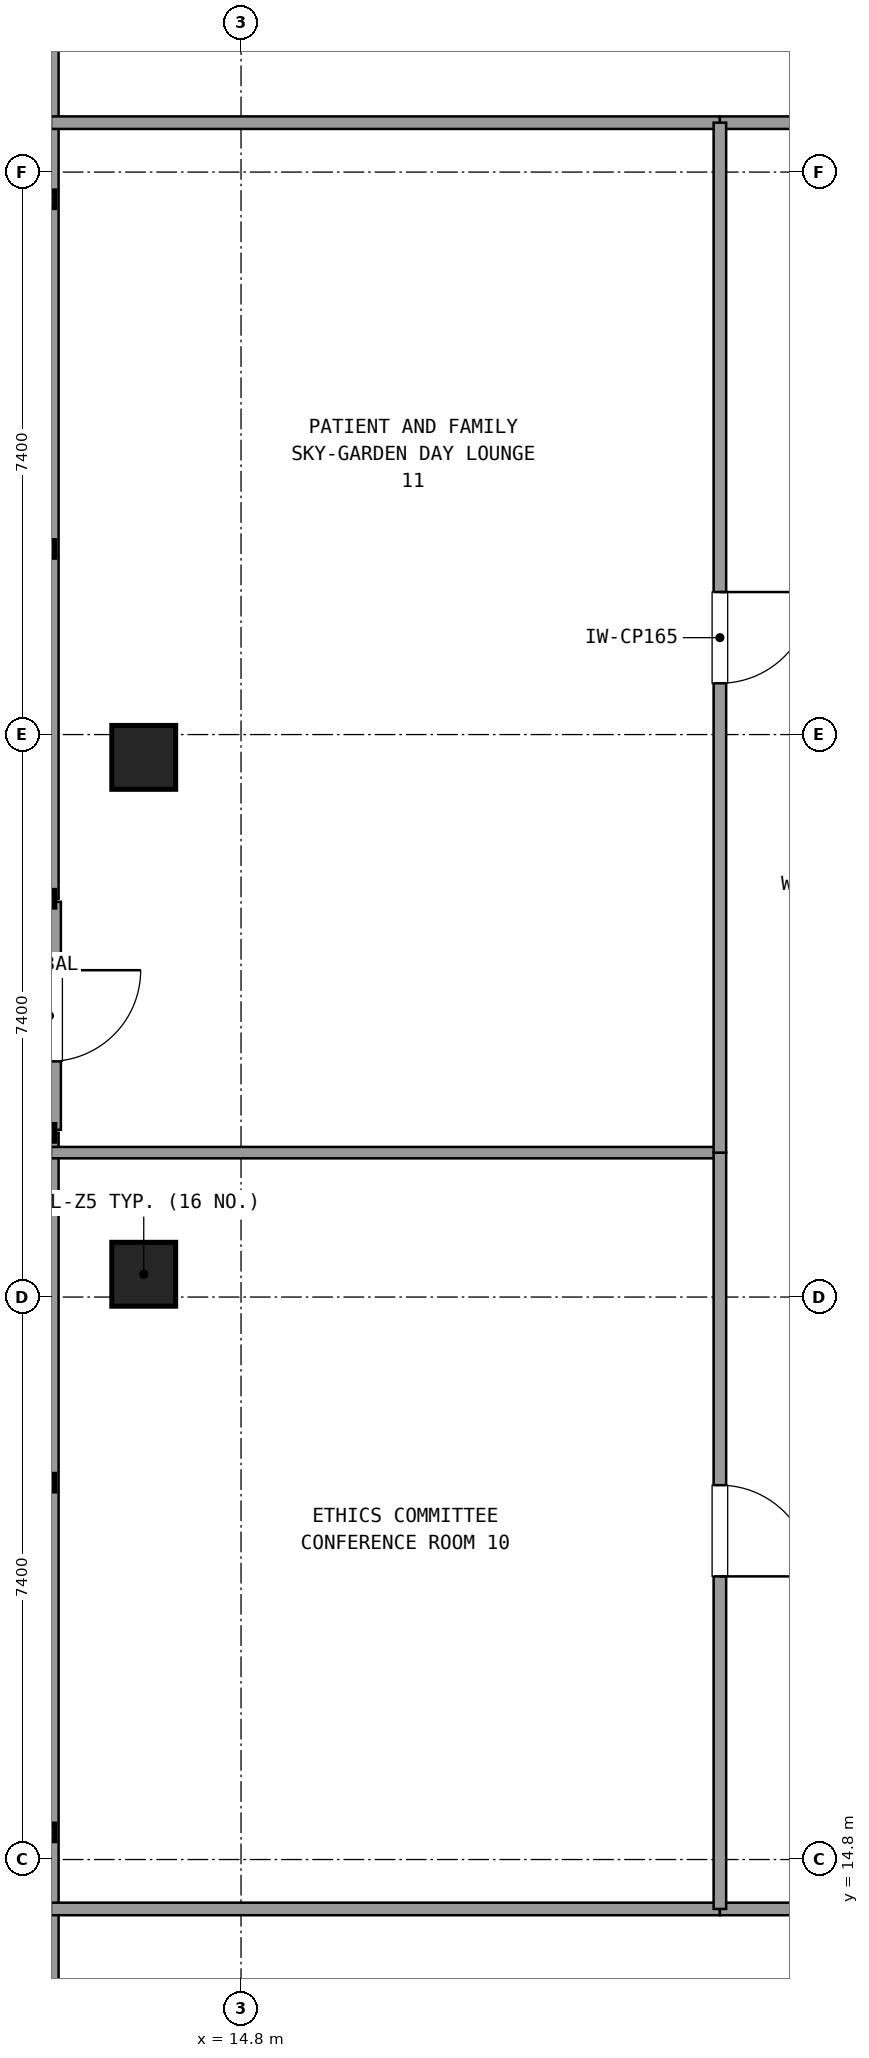
"""IFC4 building model, lengths in metres.
Left out: names, types, materials, properties, quantities, classifications, styles, units other than length and angle.
Written with IfcOpenShell. Run it as: python <this file> out.ifc"""

import sys

from ifc_helpers import new_model, si_unit, direction, frame, frame_2d, origin, origin_2d, place, context, subcontext, project, spatial, rectangle, extrude, element, fill, save


model = new_model("IFC4")
c1 = context("Model", 3, precision=1e-05, world=origin(), true_north=direction((0.0, 1.0)))
c2 = subcontext(c1, "Body", "Model", "MODEL_VIEW")
j1 = project(units=[si_unit("LENGTHUNIT", "METRE"), si_unit("PLANEANGLEUNIT", "RADIAN")], contexts=[c1])
p1 = place(None, origin())
s1 = spatial("IfcSite", under=j1, at=p1, CompositionType="ELEMENT")
p2 = place(p1, origin())
s2 = spatial("IfcBuilding", under=s1, at=p2, CompositionType="ELEMENT")
p3 = place(p2, frame((0.0, 0.0, 278.82)))
s3 = spatial("IfcBuildingStorey", under=s2, at=p3, CompositionType="ELEMENT", Elevation=278.82)
for number, where, z_axis, x_axis in (
    (1, (13.52, 22.5, 0.0), (0.0, 0.0, 1.0), (1.0, 0.0, 0.0)),
    (2, (13.52, 29.3, 0.0), (0.0, 0.0, 1.0), (1.0, 0.0, 0.0)),
):
    element("IfcColumn", number, at=place(p3, frame(where, z_axis=z_axis, x_axis=x_axis)), inside=s3, PredefinedType="COLUMN", context=c2, shape_type="SweptSolid", body=[
        extrude(rectangle(XDim=0.84, YDim=0.84, at=origin_2d()), origin(), (0.0, 0.0, 1.0), 3.6),
    ])
p4 = place(p3, frame((12.28, 27.4, 0.0), z_axis=(0.0, 0.0, 1.0), x_axis=(0.0, -1.0, 0.0)))
e3 = element("IfcWall", 3, at=p4, inside=s3, PredefinedType="SOLIDWALL", context=c2, shape_type="SweptSolid", body=[
    extrude(rectangle(XDim=3.0, YDim=0.3, at=frame_2d((1.5, 0.0))), origin(), (0.0, 0.0, 1.0), 2.69),
])
p5 = place(p4, frame((0.9, 0.0, 0.0)))
e4 = element("IfcOpeningElement", 4, at=p5, cuts=e3, PredefinedType="OPENING", context=c2, shape_type="SweptSolid", body=[
    extrude(rectangle(XDim=1.2, YDim=2.2, at=frame_2d((0.6, 1.1))), frame((0.0, 0.16, 0.0), z_axis=(0.0, -1.0, 0.0), x_axis=(1.0, 0.0, 0.0)), (0.0, 0.0, 1.0), 0.32),
])
for number, where, z_axis, x_axis in (
    (5, (12.28, 41.245, 0.0), (0.0, 0.0, 1.0), (0.0, -1.0, 0.0)),
    (6, (12.28, 24.36, 0.0), (0.0, 0.0, 1.0), (0.0, -1.0, 0.0)),
):
    element("IfcWall", number, at=place(p3, frame(where, z_axis=z_axis, x_axis=x_axis)), inside=s3, PredefinedType="SOLIDWALL", context=c2, shape_type="SweptSolid", body=[
        extrude(rectangle(XDim=13.805, YDim=0.24, at=frame_2d((6.903, 0.0))), origin(), (0.0, 0.0, 1.0), 0.85),
    ])
for number, where, z_axis, x_axis in (
    (7, (12.3, 37.65, 0.0), (0.0, 0.0, 1.0), (1.0, 0.0, 0.0)),
    (8, (12.3, 14.15, 0.0), (0.0, 0.0, 1.0), (1.0, 0.0, 0.0)),
):
    element("IfcWall", number, at=place(p3, frame(where, z_axis=z_axis, x_axis=x_axis)), inside=s3, PredefinedType="PARTITIONING", context=c2, shape_type="SweptSolid", body=[
        extrude(rectangle(XDim=8.8, YDim=0.165, at=frame_2d((4.4, 0.0))), origin(), (0.0, 0.0, 1.0), 2.61),
    ])
p6 = place(p3, frame((21.1, 37.65, 0.0), z_axis=(0.0, 0.0, 1.0), x_axis=(1.0, 0.0, 0.0)))
e9 = element("IfcWall", 9, at=p6, inside=s3, PredefinedType="PARTITIONING", context=c2, shape_type="SweptSolid", body=[
    extrude(rectangle(XDim=6.428, YDim=0.165, at=frame_2d((3.214, 0.0))), origin(), (0.0, 0.0, 1.0), 2.61),
])
p7 = place(p6, frame((2.614, 0.0, 0.0)))
e10 = element("IfcOpeningElement", 10, at=p7, cuts=e9, PredefinedType="OPENING", context=c2, shape_type="SweptSolid", body=[
    extrude(rectangle(XDim=1.2, YDim=2.15, at=frame_2d((0.6, 1.075))), frame((0.0, 0.093, 0.0), z_axis=(0.0, -1.0, 0.0), x_axis=(1.0, 0.0, 0.0)), (0.0, 0.0, 1.0), 0.185),
])
p8 = place(p3, frame((21.1, 14.15, 0.0), z_axis=(0.0, 0.0, 1.0), x_axis=(1.0, 0.0, 0.0)))
e11 = element("IfcWall", 11, at=p8, inside=s3, PredefinedType="PARTITIONING", context=c2, shape_type="SweptSolid", body=[
    extrude(rectangle(XDim=3.482, YDim=0.165, at=frame_2d((1.741, 0.0))), origin(), (0.0, 0.0, 1.0), 2.61),
])
p9 = place(p8, frame((1.141, 0.0, 0.0)))
e12 = element("IfcOpeningElement", 12, at=p9, cuts=e11, PredefinedType="OPENING", context=c2, shape_type="SweptSolid", body=[
    extrude(rectangle(XDim=1.2, YDim=2.15, at=frame_2d((0.6, 1.075))), frame((0.0, 0.093, 0.0), z_axis=(0.0, -1.0, 0.0), x_axis=(1.0, 0.0, 0.0)), (0.0, 0.0, 1.0), 0.185),
])
p10 = place(p3, frame((21.1, 24.1, 0.0), z_axis=(0.0, 0.0, 1.0), x_axis=(-1.0, 0.0, 0.0)))
e13 = element("IfcWall", 13, at=p10, inside=s3, PredefinedType="PARTITIONING", context=c2, shape_type="SweptSolid", body=[
    extrude(rectangle(XDim=8.8, YDim=0.15, at=frame_2d((4.4, 0.0))), origin(), (0.0, 0.0, 1.0), 2.61),
])
p11 = place(p3, frame((21.1, 14.15, 0.0), z_axis=(0.0, 0.0, 1.0), x_axis=(0.0, 1.0, 0.0)))
e14 = element("IfcWall", 14, at=p11, inside=s3, PredefinedType="PARTITIONING", context=c2, shape_type="SweptSolid", body=[
    extrude(rectangle(XDim=9.95, YDim=0.165, at=frame_2d((4.975, 0.0))), origin(), (0.0, 0.0, 1.0), 2.61),
])
p12 = place(p11, frame((4.375, 0.0, 0.0)))
e15 = element("IfcOpeningElement", 15, at=p12, cuts=e14, PredefinedType="OPENING", context=c2, shape_type="SweptSolid", body=[
    extrude(rectangle(XDim=1.2, YDim=2.15, at=frame_2d((0.6, 1.075))), frame((0.0, 0.093, 0.0), z_axis=(0.0, -1.0, 0.0), x_axis=(1.0, 0.0, 0.0)), (0.0, 0.0, 1.0), 0.185),
])
p13 = place(p3, frame((21.1, 24.1, 0.0), z_axis=(0.0, 0.0, 1.0), x_axis=(0.0, 1.0, 0.0)))
e16 = element("IfcWall", 16, at=p13, inside=s3, PredefinedType="PARTITIONING", context=c2, shape_type="SweptSolid", body=[
    extrude(rectangle(XDim=13.55, YDim=0.165, at=frame_2d((6.775, 0.0))), origin(), (0.0, 0.0, 1.0), 2.61),
])
p14 = place(p13, frame((6.175, 0.0, 0.0)))
e17 = element("IfcOpeningElement", 17, at=p14, cuts=e16, PredefinedType="OPENING", context=c2, shape_type="SweptSolid", body=[
    extrude(rectangle(XDim=1.2, YDim=2.15, at=frame_2d((0.6, 1.075))), frame((0.0, 0.093, 0.0), z_axis=(0.0, -1.0, 0.0), x_axis=(1.0, 0.0, 0.0)), (0.0, 0.0, 1.0), 0.185),
])
p15 = place(p12, frame((1.2, 0.0, 0.0), z_axis=(0.0, 0.0, 1.0), x_axis=(-1.0, 0.0, 0.0)))
e18 = element("IfcDoor", 18, at=p15, inside=s3, OperationType="SINGLE_SWING_LEFT", PredefinedType="DOOR", context=c2, shape_type="SweptSolid", body=[
    extrude(rectangle(XDim=1.2, YDim=2.15, at=frame_2d((0.6, 1.075))), frame((0.0, 0.025, 0.0), z_axis=(0.0, -1.0, 0.0), x_axis=(1.0, 0.0, 0.0)), (0.0, 0.0, 1.0), 0.05),
])
fill(e15, e18)
p16 = place(p14, frame((1.2, 0.0, 0.0), z_axis=(0.0, 0.0, 1.0), x_axis=(-1.0, 0.0, 0.0)))
e19 = element("IfcDoor", 19, at=p16, inside=s3, OperationType="SINGLE_SWING_RIGHT", PredefinedType="DOOR", context=c2, shape_type="SweptSolid", body=[
    extrude(rectangle(XDim=1.2, YDim=2.15, at=frame_2d((0.6, 1.075))), frame((0.0, 0.025, 0.0), z_axis=(0.0, -1.0, 0.0), x_axis=(1.0, 0.0, 0.0)), (0.0, 0.0, 1.0), 0.05),
])
fill(e17, e19)
save(model, sys.argv[1])
